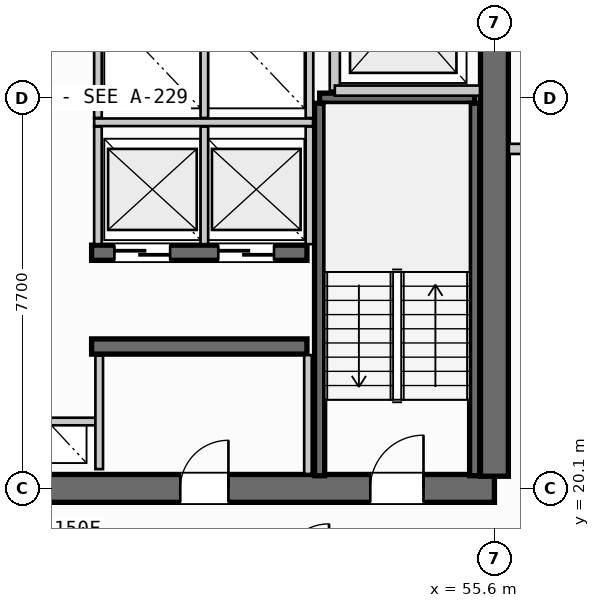
"""IFC4 building model, lengths in metres.
Left out: names, types, materials, properties, quantities, classifications, styles, units other than length and angle.
Written with IfcOpenShell. Run it as: python <this file> out.ifc"""

import sys

from ifc_helpers import new_model, si_unit, direction, frame, frame_2d, origin, place, context, subcontext, project, spatial, rectangle, extrude, source, transform, mapped, element, fill, save


model = new_model("IFC4")
c1 = context("Model", 3, precision=1e-05, world=origin(), true_north=direction((0.0, 1.0)))
c2 = subcontext(c1, "Body", "Model", "MODEL_VIEW")
j1 = project(units=[si_unit("LENGTHUNIT", "METRE"), si_unit("PLANEANGLEUNIT", "RADIAN")], contexts=[c1])
p1 = place(None, origin())
s1 = spatial("IfcSite", under=j1, at=p1, CompositionType="ELEMENT")
p2 = place(p1, origin())
s2 = spatial("IfcBuilding", under=s1, at=p2, CompositionType="ELEMENT")
p3 = place(p2, frame((0.0, 0.0, 207.9)))
s3 = spatial("IfcBuildingStorey", under=s2, at=p3, CompositionType="ELEMENT", Elevation=207.9)
p4 = place(p3, frame((38.0, 20.1, 0.0), z_axis=(0.0, 0.0, 1.0), x_axis=(1.0, 0.0, 0.0)))
e1 = element("IfcWall", 1, at=p4, inside=s3, PredefinedType="SHEAR", context=c2, shape_type="SweptSolid", body=[
    extrude(rectangle(XDim=17.6, YDim=0.55, at=frame_2d((8.8, 0.0))), origin(), (0.0, 0.0, 1.0), 3.26),
])
p5 = place(p4, frame((1.4, 0.0, 0.0)))
e2 = element("IfcOpeningElement", 2, at=p5, cuts=e1, PredefinedType="OPENING", context=c2, shape_type="SweptSolid", body=[
    extrude(rectangle(XDim=1.05, YDim=2.15, at=frame_2d((0.525, 1.075))), frame((0.0, 0.285, 0.0), z_axis=(0.0, -1.0, 0.0), x_axis=(1.0, 0.0, 0.0)), (0.0, 0.0, 1.0), 0.57),
])
p6 = place(p4, frame((15.15, 0.0, 0.0)))
e3 = element("IfcOpeningElement", 3, at=p6, cuts=e1, PredefinedType="OPENING", context=c2, shape_type="SweptSolid", body=[
    extrude(rectangle(XDim=1.05, YDim=2.15, at=frame_2d((0.525, 1.075))), frame((0.0, 0.285, 0.0), z_axis=(0.0, -1.0, 0.0), x_axis=(1.0, 0.0, 0.0)), (0.0, 0.0, 1.0), 0.57),
])
p7 = place(p4, frame((5.25, 0.0, 0.0)))
e4 = element("IfcOpeningElement", 4, at=p7, cuts=e1, PredefinedType="OPENING", context=c2, shape_type="SweptSolid", body=[
    extrude(rectangle(XDim=0.95, YDim=2.15, at=frame_2d((0.475, 1.075))), frame((0.0, 0.285, 0.0), z_axis=(0.0, -1.0, 0.0), x_axis=(1.0, 0.0, 0.0)), (0.0, 0.0, 1.0), 0.57),
])
p8 = place(p4, frame((11.4, 0.0, 0.0)))
e5 = element("IfcOpeningElement", 5, at=p8, cuts=e1, PredefinedType="OPENING", context=c2, shape_type="SweptSolid", body=[
    extrude(rectangle(XDim=0.95, YDim=2.15, at=frame_2d((0.475, 1.075))), frame((0.0, 0.285, 0.0), z_axis=(0.0, -1.0, 0.0), x_axis=(1.0, 0.0, 0.0)), (0.0, 0.0, 1.0), 0.57),
])
p9 = place(p3, frame((55.6, 20.34, 0.0), z_axis=(0.0, 0.0, 1.0), x_axis=(0.0, 1.0, 0.0)))
e6 = element("IfcWall", 6, at=p9, inside=s3, PredefinedType="SHEAR", context=c2, shape_type="SweptSolid", body=[
    extrude(rectangle(XDim=14.92, YDim=0.55, at=frame_2d((7.46, 0.0))), origin(), (0.0, 0.0, 1.0), 3.26),
])
p10 = place(p9, frame((12.71, 0.0, 0.0)))
e7 = element("IfcOpeningElement", 7, at=p10, cuts=e6, PredefinedType="OPENING", context=c2, shape_type="SweptSolid", body=[
    extrude(rectangle(XDim=1.05, YDim=2.15, at=frame_2d((0.525, 1.075))), frame((0.0, 0.285, 0.0), z_axis=(0.0, -1.0, 0.0), x_axis=(1.0, 0.0, 0.0)), (0.0, 0.0, 1.0), 0.57),
])
p11 = place(p9, frame((8.61, 0.0, 0.0)))
e8 = element("IfcOpeningElement", 8, at=p11, cuts=e6, PredefinedType="OPENING", context=c2, shape_type="SweptSolid", body=[
    extrude(rectangle(XDim=1.1, YDim=2.2, at=frame_2d((0.55, 1.1))), frame((0.0, 0.285, 0.0), z_axis=(0.0, -1.0, 0.0), x_axis=(1.0, 0.0, 0.0)), (0.0, 0.0, 1.0), 0.57),
])
p12 = place(p3, frame((47.65, 22.9, 0.0), z_axis=(0.0, 0.0, 1.0), x_axis=(1.0, 0.0, 0.0)))
e9 = element("IfcWall", 9, at=p12, inside=s3, PredefinedType="SHEAR", context=c2, shape_type="SweptSolid", body=[
    extrude(rectangle(XDim=4.25, YDim=0.3, at=frame_2d((2.125, 0.0))), origin(), (0.0, 0.0, 1.0), 3.26),
])
p13 = place(p3, frame((47.65, 24.75, 0.0), z_axis=(0.0, 0.0, 1.0), x_axis=(1.0, 0.0, 0.0)))
e10 = element("IfcWall", 10, at=p13, inside=s3, PredefinedType="SHEAR", context=c2, shape_type="SweptSolid", body=[
    extrude(rectangle(XDim=4.25, YDim=0.3, at=frame_2d((2.125, 0.0))), origin(), (0.0, 0.0, 1.0), 3.26),
])
p14 = place(p13, frame((0.45, 0.0, 0.0)))
e11 = element("IfcOpeningElement", 11, at=p14, cuts=e10, PredefinedType="OPENING", context=c2, shape_type="SweptSolid", body=[
    extrude(rectangle(XDim=1.1, YDim=2.2, at=frame_2d((0.55, 1.1))), frame((0.0, 0.16, 0.0), z_axis=(0.0, -1.0, 0.0), x_axis=(1.0, 0.0, 0.0)), (0.0, 0.0, 1.0), 0.32),
])
p15 = place(p13, frame((2.5, 0.0, 0.0)))
e12 = element("IfcOpeningElement", 12, at=p15, cuts=e10, PredefinedType="OPENING", context=c2, shape_type="SweptSolid", body=[
    extrude(rectangle(XDim=1.1, YDim=2.2, at=frame_2d((0.55, 1.1))), frame((0.0, 0.16, 0.0), z_axis=(0.0, -1.0, 0.0), x_axis=(1.0, 0.0, 0.0)), (0.0, 0.0, 1.0), 0.32),
])
p16 = place(p3, frame((52.15, 27.8, 0.0), z_axis=(0.0, 0.0, 1.0), x_axis=(1.0, 0.0, 0.0)))
e13 = element("IfcWall", 13, at=p16, inside=s3, PredefinedType="SHEAR", context=c2, shape_type="SweptSolid", body=[
    extrude(rectangle(XDim=3.06, YDim=0.2, at=frame_2d((1.53, 0.0))), origin(), (0.0, 0.0, 1.0), 3.26),
])
for number, where, z_axis, x_axis in (
    (14, (55.21, 27.7, 0.0), (0.0, 0.0, 1.0), (0.0, -1.0, 0.0)),
    (15, (52.15, 20.35, 0.0), (0.0, 0.0, 1.0), (0.0, 1.0, 0.0)),
):
    element("IfcWall", number, at=place(p3, frame(where, z_axis=z_axis, x_axis=x_axis)), inside=s3, PredefinedType="SHEAR", context=c2, shape_type="SweptSolid", body=[
        extrude(rectangle(XDim=7.35, YDim=0.2, at=frame_2d((3.675, 0.0))), origin(), (0.0, 0.0, 1.0), 3.26),
    ])
p17 = place(p3, frame((45.8, 21.42, 0.0), z_axis=(0.0, 0.0, 1.0), x_axis=(1.0, 0.0, 0.0)))
e16 = element("IfcWall", 16, at=p17, inside=s3, PredefinedType="PARTITIONING", context=c2, shape_type="SweptSolid", body=[
    extrude(rectangle(XDim=2.0, YDim=0.15, at=frame_2d((1.0, 0.0))), origin(), (0.0, 0.0, 1.0), 2.455),
])
p18 = place(p3, frame((47.8, 20.48, 0.0), z_axis=(0.0, 0.0, 1.0), x_axis=(0.0, 1.0, 0.0)))
e17 = element("IfcWall", 17, at=p18, inside=s3, PredefinedType="PARTITIONING", context=c2, shape_type="SweptSolid", body=[
    extrude(rectangle(XDim=2.24, YDim=0.15, at=frame_2d((1.12, 0.0))), origin(), (0.0, 0.0, 1.0), 2.455),
])
p19 = place(p3, frame((52.45, 27.95, 0.0), z_axis=(0.0, 0.0, 1.0), x_axis=(0.0, 1.0, 0.0)))
e18 = element("IfcWall", 18, at=p19, inside=s3, PredefinedType="PARTITIONING", context=c2, shape_type="SweptSolid", body=[
    extrude(rectangle(XDim=3.1, YDim=0.2, at=frame_2d((1.55, 0.0))), origin(), (0.0, 0.0, 1.0), 2.455),
])
p20 = place(p3, frame((52.45, 27.95, 0.0), z_axis=(0.0, 0.0, 1.0), x_axis=(1.0, 0.0, 0.0)))
e19 = element("IfcWall", 19, at=p20, inside=s3, PredefinedType="PARTITIONING", context=c2, shape_type="SweptSolid", body=[
    extrude(rectangle(XDim=2.865, YDim=0.2, at=frame_2d((1.433, 0.0))), origin(), (0.0, 0.0, 1.0), 2.455),
])
p21 = place(p3, frame((55.885, 26.8, 0.0), z_axis=(0.0, 0.0, 1.0), x_axis=(1.0, 0.0, 0.0)))
e20 = element("IfcWall", 20, at=p21, inside=s3, PredefinedType="PARTITIONING", context=c2, shape_type="SweptSolid", body=[
    extrude(rectangle(XDim=3.215, YDim=0.2, at=frame_2d((1.607, 0.0))), origin(), (0.0, 0.0, 1.0), 2.455),
])
p22 = place(p3, frame((51.92, 20.385, 0.0), z_axis=(0.0, 0.0, 1.0), x_axis=(0.0, 1.0, 0.0)))
e21 = element("IfcWall", 21, at=p22, inside=s3, PredefinedType="PARTITIONING", context=c2, shape_type="SweptSolid", body=[
    extrude(rectangle(XDim=2.345, YDim=0.15, at=frame_2d((1.172, 0.0))), origin(), (0.0, 0.0, 1.0), 2.455),
])
p23 = place(p3, frame((47.7, 27.325, 0.0), z_axis=(0.0, 0.0, 1.0), x_axis=(1.0, 0.0, 0.0)))
e22 = element("IfcWall", 22, at=p23, inside=s3, PredefinedType="PARTITIONING", context=c2, shape_type="SweptSolid", body=[
    extrude(rectangle(XDim=4.32, YDim=0.15, at=frame_2d((2.16, 0.0))), origin(), (0.0, 0.0, 1.0), 2.455),
])
for number, where, z_axis, x_axis in (
    (23, (47.775, 24.92, 0.0), (0.0, 0.0, 1.0), (0.0, 1.0, 0.0)),
    (24, (49.875, 24.92, 0.0), (0.0, 0.0, 1.0), (0.0, 1.0, 0.0)),
    (25, (51.95, 24.92, 0.0), (0.0, 0.0, 1.0), (0.0, 1.0, 0.0)),
):
    element("IfcWall", number, at=place(p3, frame(where, z_axis=z_axis, x_axis=x_axis)), inside=s3, PredefinedType="PARTITIONING", context=c2, shape_type="SweptSolid", body=[
        extrude(rectangle(XDim=2.32, YDim=0.15, at=frame_2d((1.16, 0.0))), origin(), (0.0, 0.0, 1.0), 2.455),
    ])
for number, where, z_axis, x_axis in (
    (26, (47.775, 27.41, 0.0), (0.0, 0.0, 1.0), (0.0, 1.0, 0.0)),
    (27, (49.875, 27.41, 0.0), (0.0, 0.0, 1.0), (0.0, 1.0, 0.0)),
    (28, (51.95, 27.41, 0.0), (0.0, 0.0, 1.0), (0.0, 1.0, 0.0)),
):
    element("IfcWall", number, at=place(p3, frame(where, z_axis=z_axis, x_axis=x_axis)), inside=s3, PredefinedType="PARTITIONING", context=c2, shape_type="SweptSolid", body=[
        extrude(rectangle(XDim=2.27, YDim=0.15, at=frame_2d((1.135, 0.0))), origin(), (0.0, 0.0, 1.0), 2.455),
    ])
m1 = source(origin(), c2, "Body", "SweptSolid", [
    extrude(rectangle(XDim=1.05, YDim=2.15, at=frame_2d((0.525, 1.075))), frame((0.0, 0.025, 0.0), z_axis=(0.0, -1.0, 0.0), x_axis=(1.0, 0.0, 0.0)), (0.0, 0.0, 1.0), 0.05),
])
p24 = place(p6, origin())
e29 = element("IfcDoor", 29, at=p24, inside=s3, OperationType="SINGLE_SWING_RIGHT", PredefinedType="DOOR", context=c2, shape_type="MappedRepresentation", body=[
    mapped(m1, transform((0.0, 0.0, 0.0), scale=1.0)),
])
fill(e3, e29)
m2 = source(origin(), c2, "Body", "SweptSolid", [
    extrude(rectangle(XDim=0.95, YDim=2.15, at=frame_2d((0.475, 1.075))), frame((0.0, 0.025, 0.0), z_axis=(0.0, -1.0, 0.0), x_axis=(1.0, 0.0, 0.0)), (0.0, 0.0, 1.0), 0.05),
])
p25 = place(p8, origin())
e30 = element("IfcDoor", 30, at=p25, inside=s3, OperationType="SINGLE_SWING_RIGHT", PredefinedType="DOOR", context=c2, shape_type="MappedRepresentation", body=[
    mapped(m2, transform((0.0, 0.0, 0.0), scale=1.0)),
])
fill(e5, e30)
m3 = source(origin(), c2, "Body", "SweptSolid", [
    extrude(rectangle(XDim=1.1, YDim=2.2, at=frame_2d((0.55, 1.1))), frame((0.0, 0.025, 0.0), z_axis=(0.0, -1.0, 0.0), x_axis=(1.0, 0.0, 0.0)), (0.0, 0.0, 1.0), 0.05),
])
p26 = place(p14, origin())
e31 = element("IfcDoor", 31, at=p26, inside=s3, OperationType="SLIDING_TO_RIGHT", PredefinedType="DOOR", context=c2, shape_type="MappedRepresentation", body=[
    mapped(m3, transform((0.0, 0.0, 0.0), scale=1.0)),
])
fill(e11, e31)
p27 = place(p15, origin())
e32 = element("IfcDoor", 32, at=p27, inside=s3, OperationType="SLIDING_TO_RIGHT", PredefinedType="DOOR", context=c2, shape_type="MappedRepresentation", body=[
    mapped(m3, transform((0.0, 0.0, 0.0), scale=1.0)),
])
fill(e12, e32)
save(model, sys.argv[1])
